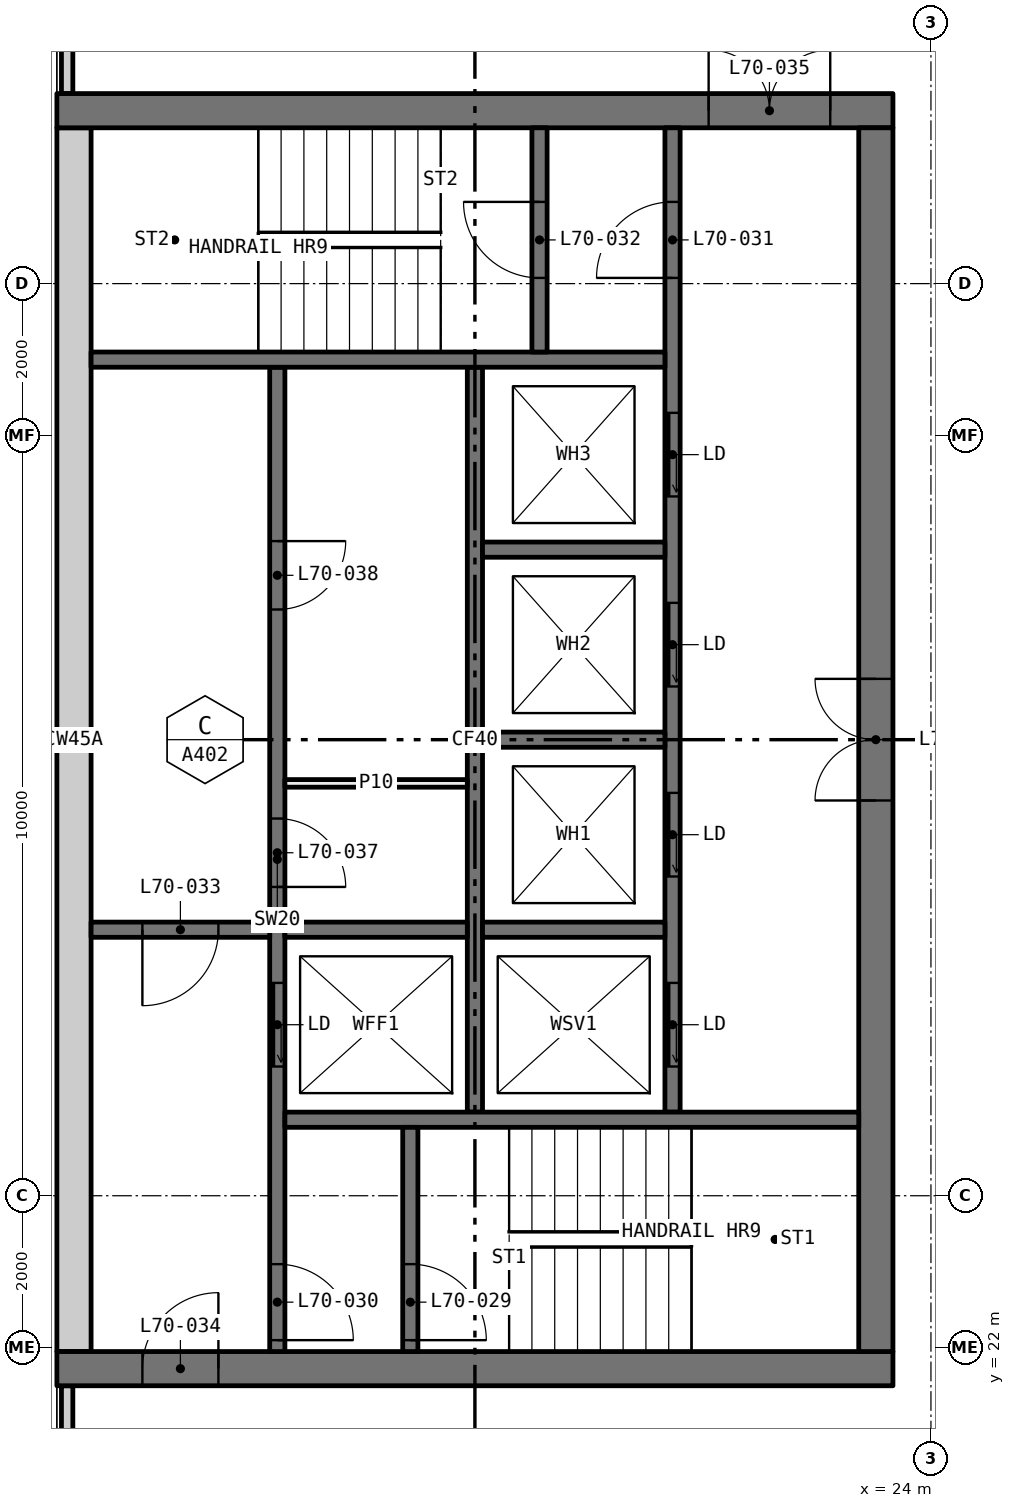
"""IFC4 building model, lengths in metres.
Left out: names, types, materials, properties, quantities, classifications, styles, units other than length and angle.
Written with IfcOpenShell. Run it as: python <this file> out.ifc"""

import sys

from ifc_helpers import new_model, si_unit, direction, frame, frame_2d, origin, place, context, subcontext, project, spatial, rectangle, extrude, element, fill, save


model = new_model("IFC4")
c1 = context("Model", 3, precision=1e-05, world=origin(), true_north=direction((0.0, 1.0)))
c2 = subcontext(c1, "Body", "Model", "MODEL_VIEW")
j1 = project(units=[si_unit("LENGTHUNIT", "METRE"), si_unit("PLANEANGLEUNIT", "RADIAN")], contexts=[c1])
p1 = place(None, origin())
s1 = spatial("IfcSite", under=j1, at=p1, CompositionType="ELEMENT")
p2 = place(p1, origin())
s2 = spatial("IfcBuilding", under=s1, at=p2, CompositionType="ELEMENT")
p3 = place(p2, frame((0.0, 0.0, 259.35)))
s3 = spatial("IfcBuildingStorey", under=s2, at=p3, CompositionType="ELEMENT", Elevation=259.35)
for number, where, z_axis, x_axis in (
    (1, (12.635, 18.71, 0.0), (0.0, 0.0, 1.0), (0.0, 1.0, 0.0)),
    (2, (12.635, 38.5, 0.0), (0.0, 0.0, 1.0), (0.0, 1.0, 0.0)),
):
    element("IfcWall", number, at=place(p3, frame(where, z_axis=z_axis, x_axis=x_axis)), inside=s3, PredefinedType="ELEMENTEDWALL", context=c2, shape_type="SweptSolid", body=[
        extrude(rectangle(XDim=2.79, YDim=0.15, at=frame_2d((1.395, 0.0))), origin(), (0.0, 0.0, 1.0), 3.05),
    ])
p4 = place(p3, frame((12.5, 21.725, 0.0), z_axis=(0.0, 0.0, 1.0), x_axis=(1.0, 0.0, 0.0)))
e3 = element("IfcWall", 3, at=p4, inside=s3, PredefinedType="SHEAR", context=c2, shape_type="SweptSolid", body=[
    extrude(rectangle(XDim=11.0, YDim=0.45, at=frame_2d((5.5, 0.0))), origin(), (0.0, 0.0, 1.0), 3.05),
])
p5 = place(p4, frame((1.125, 0.0, 0.0)))
e4 = element("IfcOpeningElement", 4, at=p5, cuts=e3, PredefinedType="OPENING", context=c2, shape_type="SweptSolid", body=[
    extrude(rectangle(XDim=1.0, YDim=2.1, at=frame_2d((0.5, 1.05))), frame((0.0, 0.235, 0.0), z_axis=(0.0, -1.0, 0.0), x_axis=(1.0, 0.0, 0.0)), (0.0, 0.0, 1.0), 0.47),
])
p6 = place(p3, frame((12.5, 38.275, 0.0), z_axis=(0.0, 0.0, 1.0), x_axis=(1.0, 0.0, 0.0)))
e5 = element("IfcWall", 5, at=p6, inside=s3, PredefinedType="SHEAR", context=c2, shape_type="SweptSolid", body=[
    extrude(rectangle(XDim=11.0, YDim=0.45, at=frame_2d((5.5, 0.0))), origin(), (0.0, 0.0, 1.0), 3.05),
])
p7 = place(p6, frame((8.575, 0.0, 0.0)))
e6 = element("IfcOpeningElement", 6, at=p7, cuts=e5, PredefinedType="OPENING", context=c2, shape_type="SweptSolid", body=[
    extrude(rectangle(XDim=1.6, YDim=2.1, at=frame_2d((0.8, 1.05))), frame((0.0, 0.235, 0.0), z_axis=(0.0, -1.0, 0.0), x_axis=(1.0, 0.0, 0.0)), (0.0, 0.0, 1.0), 0.47),
])
p8 = place(p3, frame((12.725, 21.95, 0.0), z_axis=(0.0, 0.0, 1.0), x_axis=(0.0, 1.0, 0.0)))
e7 = element("IfcWall", 7, at=p8, inside=s3, PredefinedType="SHEAR", context=c2, shape_type="SweptSolid", body=[
    extrude(rectangle(XDim=16.1, YDim=0.45, at=frame_2d((8.05, 0.0))), origin(), (0.0, 0.0, 1.0), 3.05),
])
p9 = place(p3, frame((23.275, 21.95, 0.0), z_axis=(0.0, 0.0, 1.0), x_axis=(0.0, 1.0, 0.0)))
e8 = element("IfcWall", 8, at=p9, inside=s3, PredefinedType="SHEAR", context=c2, shape_type="SweptSolid", body=[
    extrude(rectangle(XDim=16.1, YDim=0.45, at=frame_2d((8.05, 0.0))), origin(), (0.0, 0.0, 1.0), 3.05),
])
p10 = place(p9, frame((7.25, 0.0, 0.0)))
e9 = element("IfcOpeningElement", 9, at=p10, cuts=e8, PredefinedType="OPENING", context=c2, shape_type="SweptSolid", body=[
    extrude(rectangle(XDim=1.6, YDim=2.1, at=frame_2d((0.8, 1.05))), frame((0.0, 0.235, 0.0), z_axis=(0.0, -1.0, 0.0), x_axis=(1.0, 0.0, 0.0)), (0.0, 0.0, 1.0), 0.47),
])
p11 = place(p3, frame((15.4, 21.95, 0.0), z_axis=(0.0, 0.0, 1.0), x_axis=(0.0, 1.0, 0.0)))
e10 = element("IfcWall", 10, at=p11, inside=s3, PredefinedType="SOLIDWALL", context=c2, shape_type="SweptSolid", body=[
    extrude(rectangle(XDim=12.95, YDim=0.2, at=frame_2d((6.475, 0.0))), origin(), (0.0, 0.0, 1.0), 3.05),
])
p12 = place(p11, frame((3.75, 0.0, 0.0)))
e11 = element("IfcOpeningElement", 11, at=p12, cuts=e10, PredefinedType="OPENING", context=c2, shape_type="SweptSolid", body=[
    extrude(rectangle(XDim=1.1, YDim=2.1, at=frame_2d((0.55, 1.05))), frame((0.0, 0.11, 0.0), z_axis=(0.0, -1.0, 0.0), x_axis=(1.0, 0.0, 0.0)), (0.0, 0.0, 1.0), 0.22),
])
p13 = place(p11, frame((0.15, 0.0, 0.0)))
e12 = element("IfcOpeningElement", 12, at=p13, cuts=e10, PredefinedType="OPENING", context=c2, shape_type="SweptSolid", body=[
    extrude(rectangle(XDim=1.0, YDim=2.1, at=frame_2d((0.5, 1.05))), frame((0.0, 0.11, 0.0), z_axis=(0.0, -1.0, 0.0), x_axis=(1.0, 0.0, 0.0)), (0.0, 0.0, 1.0), 0.22),
])
p14 = place(p11, frame((6.113, 0.0, 0.0)))
e13 = element("IfcOpeningElement", 13, at=p14, cuts=e10, PredefinedType="OPENING", context=c2, shape_type="SweptSolid", body=[
    extrude(rectangle(XDim=0.9, YDim=2.1, at=frame_2d((0.45, 1.05))), frame((0.0, 0.11, 0.0), z_axis=(0.0, -1.0, 0.0), x_axis=(1.0, 0.0, 0.0)), (0.0, 0.0, 1.0), 0.22),
])
p15 = place(p11, frame((9.762, 0.0, 0.0)))
e14 = element("IfcOpeningElement", 14, at=p15, cuts=e10, PredefinedType="OPENING", context=c2, shape_type="SweptSolid", body=[
    extrude(rectangle(XDim=0.9, YDim=2.1, at=frame_2d((0.45, 1.05))), frame((0.0, 0.11, 0.0), z_axis=(0.0, -1.0, 0.0), x_axis=(1.0, 0.0, 0.0)), (0.0, 0.0, 1.0), 0.22),
])
p16 = place(p3, frame((20.6, 25.1, 0.0), z_axis=(0.0, 0.0, 1.0), x_axis=(0.0, 1.0, 0.0)))
e15 = element("IfcWall", 15, at=p16, inside=s3, PredefinedType="SOLIDWALL", context=c2, shape_type="SweptSolid", body=[
    extrude(rectangle(XDim=12.95, YDim=0.2, at=frame_2d((6.475, 0.0))), origin(), (0.0, 0.0, 1.0), 3.05),
])
p17 = place(p16, frame((0.6, 0.0, 0.0)))
e16 = element("IfcOpeningElement", 16, at=p17, cuts=e15, PredefinedType="OPENING", context=c2, shape_type="SweptSolid", body=[
    extrude(rectangle(XDim=1.1, YDim=2.1, at=frame_2d((0.55, 1.05))), frame((0.0, 0.11, 0.0), z_axis=(0.0, -1.0, 0.0), x_axis=(1.0, 0.0, 0.0)), (0.0, 0.0, 1.0), 0.22),
])
p18 = place(p16, frame((3.1, 0.0, 0.0)))
e17 = element("IfcOpeningElement", 17, at=p18, cuts=e15, PredefinedType="OPENING", context=c2, shape_type="SweptSolid", body=[
    extrude(rectangle(XDim=1.1, YDim=2.1, at=frame_2d((0.55, 1.05))), frame((0.0, 0.11, 0.0), z_axis=(0.0, -1.0, 0.0), x_axis=(1.0, 0.0, 0.0)), (0.0, 0.0, 1.0), 0.22),
])
p19 = place(p16, frame((5.6, 0.0, 0.0)))
e18 = element("IfcOpeningElement", 18, at=p19, cuts=e15, PredefinedType="OPENING", context=c2, shape_type="SweptSolid", body=[
    extrude(rectangle(XDim=1.1, YDim=2.1, at=frame_2d((0.55, 1.05))), frame((0.0, 0.11, 0.0), z_axis=(0.0, -1.0, 0.0), x_axis=(1.0, 0.0, 0.0)), (0.0, 0.0, 1.0), 0.22),
])
p20 = place(p16, frame((8.1, 0.0, 0.0)))
e19 = element("IfcOpeningElement", 19, at=p20, cuts=e15, PredefinedType="OPENING", context=c2, shape_type="SweptSolid", body=[
    extrude(rectangle(XDim=1.1, YDim=2.1, at=frame_2d((0.55, 1.05))), frame((0.0, 0.11, 0.0), z_axis=(0.0, -1.0, 0.0), x_axis=(1.0, 0.0, 0.0)), (0.0, 0.0, 1.0), 0.22),
])
p21 = place(p16, frame((10.975, 0.0, 0.0)))
e20 = element("IfcOpeningElement", 20, at=p21, cuts=e15, PredefinedType="OPENING", context=c2, shape_type="SweptSolid", body=[
    extrude(rectangle(XDim=1.0, YDim=2.1, at=frame_2d((0.5, 1.05))), frame((0.0, 0.11, 0.0), z_axis=(0.0, -1.0, 0.0), x_axis=(1.0, 0.0, 0.0)), (0.0, 0.0, 1.0), 0.22),
])
p22 = place(p3, frame((18.0, 25.1, 0.0), z_axis=(0.0, 0.0, 1.0), x_axis=(0.0, 1.0, 0.0)))
e21 = element("IfcWall", 21, at=p22, inside=s3, PredefinedType="SOLIDWALL", context=c2, shape_type="SweptSolid", body=[
    extrude(rectangle(XDim=9.8, YDim=0.2, at=frame_2d((4.9, 0.0))), origin(), (0.0, 0.0, 1.0), 3.05),
])
for number, where, z_axis, x_axis in (
    (22, (15.5, 25.0, 0.0), (0.0, 0.0, 1.0), (1.0, 0.0, 0.0)),
    (23, (12.95, 35.0, 0.0), (0.0, 0.0, 1.0), (1.0, 0.0, 0.0)),
):
    element("IfcWall", number, at=place(p3, frame(where, z_axis=z_axis, x_axis=x_axis)), inside=s3, PredefinedType="SOLIDWALL", context=c2, shape_type="SweptSolid", body=[
        extrude(rectangle(XDim=7.55, YDim=0.2, at=frame_2d((3.775, 0.0))), origin(), (0.0, 0.0, 1.0), 3.05),
    ])
p23 = place(p3, frame((12.95, 27.5, 0.0), z_axis=(0.0, 0.0, 1.0), x_axis=(1.0, 0.0, 0.0)))
e24 = element("IfcWall", 24, at=p23, inside=s3, PredefinedType="SOLIDWALL", context=c2, shape_type="SweptSolid", body=[
    extrude(rectangle(XDim=2.35, YDim=0.2, at=frame_2d((1.175, 0.0))), origin(), (0.0, 0.0, 1.0), 3.05),
])
p24 = place(p23, frame((0.675, 0.0, 0.0)))
e25 = element("IfcOpeningElement", 25, at=p24, cuts=e24, PredefinedType="OPENING", context=c2, shape_type="SweptSolid", body=[
    extrude(rectangle(XDim=1.0, YDim=2.1, at=frame_2d((0.5, 1.05))), frame((0.0, 0.11, 0.0), z_axis=(0.0, -1.0, 0.0), x_axis=(1.0, 0.0, 0.0)), (0.0, 0.0, 1.0), 0.22),
])
p25 = place(p3, frame((17.15, 21.95, 0.0), z_axis=(0.0, 0.0, 1.0), x_axis=(0.0, 1.0, 0.0)))
e26 = element("IfcWall", 26, at=p25, inside=s3, PredefinedType="SOLIDWALL", context=c2, shape_type="SweptSolid", body=[
    extrude(rectangle(XDim=2.95, YDim=0.2, at=frame_2d((1.475, 0.0))), origin(), (0.0, 0.0, 1.0), 3.05),
])
p26 = place(p25, frame((0.15, 0.0, 0.0)))
e27 = element("IfcOpeningElement", 27, at=p26, cuts=e26, PredefinedType="OPENING", context=c2, shape_type="SweptSolid", body=[
    extrude(rectangle(XDim=1.0, YDim=2.1, at=frame_2d((0.5, 1.05))), frame((0.0, 0.11, 0.0), z_axis=(0.0, -1.0, 0.0), x_axis=(1.0, 0.0, 0.0)), (0.0, 0.0, 1.0), 0.22),
])
p27 = place(p3, frame((18.85, 35.1, 0.0), z_axis=(0.0, 0.0, 1.0), x_axis=(0.0, 1.0, 0.0)))
e28 = element("IfcWall", 28, at=p27, inside=s3, PredefinedType="SOLIDWALL", context=c2, shape_type="SweptSolid", body=[
    extrude(rectangle(XDim=2.95, YDim=0.2, at=frame_2d((1.475, 0.0))), origin(), (0.0, 0.0, 1.0), 3.05),
])
p28 = place(p27, frame((0.975, 0.0, 0.0)))
e29 = element("IfcOpeningElement", 29, at=p28, cuts=e28, PredefinedType="OPENING", context=c2, shape_type="SweptSolid", body=[
    extrude(rectangle(XDim=1.0, YDim=2.1, at=frame_2d((0.5, 1.05))), frame((0.0, 0.11, 0.0), z_axis=(0.0, -1.0, 0.0), x_axis=(1.0, 0.0, 0.0)), (0.0, 0.0, 1.0), 0.22),
])
for number, where, z_axis, x_axis in (
    (30, (15.5, 27.5, 0.0), (0.0, 0.0, 1.0), (1.0, 0.0, 0.0)),
    (31, (18.1, 27.5, 0.0), (0.0, 0.0, 1.0), (1.0, 0.0, 0.0)),
    (32, (18.1, 30.0, 0.0), (0.0, 0.0, 1.0), (1.0, 0.0, 0.0)),
    (33, (18.1, 32.5, 0.0), (0.0, 0.0, 1.0), (1.0, 0.0, 0.0)),
):
    element("IfcWall", number, at=place(p3, frame(where, z_axis=z_axis, x_axis=x_axis)), inside=s3, PredefinedType="SOLIDWALL", context=c2, shape_type="SweptSolid", body=[
        extrude(rectangle(XDim=2.4, YDim=0.2, at=frame_2d((1.2, 0.0))), origin(), (0.0, 0.0, 1.0), 3.05),
    ])
p29 = place(p3, frame((15.5, 29.425, 0.0), z_axis=(0.0, 0.0, 1.0), x_axis=(1.0, 0.0, 0.0)))
e34 = element("IfcWall", 34, at=p29, inside=s3, PredefinedType="PARTITIONING", context=c2, shape_type="SweptSolid", body=[
    extrude(rectangle(XDim=2.4, YDim=0.1, at=frame_2d((1.2, 0.0))), origin(), (0.0, 0.0, 1.0), 3.05),
])
p30 = place(p17, origin())
e35 = element("IfcDoor", 35, at=p30, inside=s3, OperationType="SLIDING_TO_LEFT", PredefinedType="DOOR", context=c2, shape_type="SweptSolid", body=[
    extrude(rectangle(XDim=1.1, YDim=2.1, at=frame_2d((0.55, 1.05))), frame((0.0, 0.025, 0.0), z_axis=(0.0, -1.0, 0.0), x_axis=(1.0, 0.0, 0.0)), (0.0, 0.0, 1.0), 0.05),
])
fill(e16, e35)
p31 = place(p18, origin())
e36 = element("IfcDoor", 36, at=p31, inside=s3, OperationType="SLIDING_TO_LEFT", PredefinedType="DOOR", context=c2, shape_type="SweptSolid", body=[
    extrude(rectangle(XDim=1.1, YDim=2.1, at=frame_2d((0.55, 1.05))), frame((0.0, 0.025, 0.0), z_axis=(0.0, -1.0, 0.0), x_axis=(1.0, 0.0, 0.0)), (0.0, 0.0, 1.0), 0.05),
])
fill(e17, e36)
p32 = place(p19, origin())
e37 = element("IfcDoor", 37, at=p32, inside=s3, OperationType="SLIDING_TO_LEFT", PredefinedType="DOOR", context=c2, shape_type="SweptSolid", body=[
    extrude(rectangle(XDim=1.1, YDim=2.1, at=frame_2d((0.55, 1.05))), frame((0.0, 0.025, 0.0), z_axis=(0.0, -1.0, 0.0), x_axis=(1.0, 0.0, 0.0)), (0.0, 0.0, 1.0), 0.05),
])
fill(e18, e37)
p33 = place(p20, origin())
e38 = element("IfcDoor", 38, at=p33, inside=s3, OperationType="SLIDING_TO_LEFT", PredefinedType="DOOR", context=c2, shape_type="SweptSolid", body=[
    extrude(rectangle(XDim=1.1, YDim=2.1, at=frame_2d((0.55, 1.05))), frame((0.0, 0.025, 0.0), z_axis=(0.0, -1.0, 0.0), x_axis=(1.0, 0.0, 0.0)), (0.0, 0.0, 1.0), 0.05),
])
fill(e19, e38)
p34 = place(p12, origin())
e39 = element("IfcDoor", 39, at=p34, inside=s3, OperationType="SLIDING_TO_LEFT", PredefinedType="DOOR", context=c2, shape_type="SweptSolid", body=[
    extrude(rectangle(XDim=1.1, YDim=2.1, at=frame_2d((0.55, 1.05))), frame((0.0, 0.025, 0.0), z_axis=(0.0, -1.0, 0.0), x_axis=(1.0, 0.0, 0.0)), (0.0, 0.0, 1.0), 0.05),
])
fill(e11, e39)
p35 = place(p26, frame((1.0, 0.0, 0.0), x_axis=(-1.0, 0.0, 0.0)))
e40 = element("IfcDoor", 40, at=p35, inside=s3, OperationType="SINGLE_SWING_LEFT", PredefinedType="DOOR", context=c2, shape_type="SweptSolid", body=[
    extrude(rectangle(XDim=1.0, YDim=2.1, at=frame_2d((0.5, 1.05))), frame((0.0, 0.025, 0.0), z_axis=(0.0, -1.0, 0.0), x_axis=(1.0, 0.0, 0.0)), (0.0, 0.0, 1.0), 0.05),
])
fill(e27, e40)
p36 = place(p13, frame((1.0, 0.0, 0.0), x_axis=(-1.0, 0.0, 0.0)))
e41 = element("IfcDoor", 41, at=p36, inside=s3, OperationType="SINGLE_SWING_LEFT", PredefinedType="DOOR", context=c2, shape_type="SweptSolid", body=[
    extrude(rectangle(XDim=1.0, YDim=2.1, at=frame_2d((0.5, 1.05))), frame((0.0, 0.025, 0.0), z_axis=(0.0, -1.0, 0.0), x_axis=(1.0, 0.0, 0.0)), (0.0, 0.0, 1.0), 0.05),
])
fill(e12, e41)
p37 = place(p21, origin())
e42 = element("IfcDoor", 42, at=p37, inside=s3, OperationType="SINGLE_SWING_RIGHT", PredefinedType="DOOR", context=c2, shape_type="SweptSolid", body=[
    extrude(rectangle(XDim=1.0, YDim=2.1, at=frame_2d((0.5, 1.05))), frame((0.0, 0.025, 0.0), z_axis=(0.0, -1.0, 0.0), x_axis=(1.0, 0.0, 0.0)), (0.0, 0.0, 1.0), 0.05),
])
fill(e20, e42)
p38 = place(p28, origin())
e43 = element("IfcDoor", 43, at=p38, inside=s3, OperationType="SINGLE_SWING_LEFT", PredefinedType="DOOR", context=c2, shape_type="SweptSolid", body=[
    extrude(rectangle(XDim=1.0, YDim=2.1, at=frame_2d((0.5, 1.05))), frame((0.0, 0.025, 0.0), z_axis=(0.0, -1.0, 0.0), x_axis=(1.0, 0.0, 0.0)), (0.0, 0.0, 1.0), 0.05),
])
fill(e29, e43)
p39 = place(p24, frame((1.0, 0.0, 0.0), x_axis=(-1.0, 0.0, 0.0)))
e44 = element("IfcDoor", 44, at=p39, inside=s3, OperationType="SINGLE_SWING_LEFT", PredefinedType="DOOR", context=c2, shape_type="SweptSolid", body=[
    extrude(rectangle(XDim=1.0, YDim=2.1, at=frame_2d((0.5, 1.05))), frame((0.0, 0.025, 0.0), z_axis=(0.0, -1.0, 0.0), x_axis=(1.0, 0.0, 0.0)), (0.0, 0.0, 1.0), 0.05),
])
fill(e25, e44)
p40 = place(p5, origin())
e45 = element("IfcDoor", 45, at=p40, inside=s3, OperationType="SINGLE_SWING_LEFT", PredefinedType="DOOR", context=c2, shape_type="SweptSolid", body=[
    extrude(rectangle(XDim=1.0, YDim=2.1, at=frame_2d((0.5, 1.05))), frame((0.0, 0.025, 0.0), z_axis=(0.0, -1.0, 0.0), x_axis=(1.0, 0.0, 0.0)), (0.0, 0.0, 1.0), 0.05),
])
fill(e4, e45)
p41 = place(p7, origin())
e46 = element("IfcDoor", 46, at=p41, inside=s3, OperationType="DOUBLE_DOOR_SINGLE_SWING", PredefinedType="DOOR", context=c2, shape_type="SweptSolid", body=[
    extrude(rectangle(XDim=1.6, YDim=2.1, at=frame_2d((0.8, 1.05))), frame((0.0, 0.025, 0.0), z_axis=(0.0, -1.0, 0.0), x_axis=(1.0, 0.0, 0.0)), (0.0, 0.0, 1.0), 0.05),
])
fill(e6, e46)
p42 = place(p10, origin())
e47 = element("IfcDoor", 47, at=p42, inside=s3, OperationType="DOUBLE_DOOR_SINGLE_SWING", PredefinedType="DOOR", context=c2, shape_type="SweptSolid", body=[
    extrude(rectangle(XDim=1.6, YDim=2.1, at=frame_2d((0.8, 1.05))), frame((0.0, 0.025, 0.0), z_axis=(0.0, -1.0, 0.0), x_axis=(1.0, 0.0, 0.0)), (0.0, 0.0, 1.0), 0.05),
])
fill(e9, e47)
p43 = place(p14, frame((0.9, 0.0, 0.0), x_axis=(-1.0, 0.0, 0.0)))
e48 = element("IfcDoor", 48, at=p43, inside=s3, OperationType="SINGLE_SWING_LEFT", PredefinedType="DOOR", context=c2, shape_type="SweptSolid", body=[
    extrude(rectangle(XDim=0.9, YDim=2.1, at=frame_2d((0.45, 1.05))), frame((0.0, 0.025, 0.0), z_axis=(0.0, -1.0, 0.0), x_axis=(1.0, 0.0, 0.0)), (0.0, 0.0, 1.0), 0.05),
])
fill(e13, e48)
p44 = place(p15, frame((0.9, 0.0, 0.0), x_axis=(-1.0, 0.0, 0.0)))
e49 = element("IfcDoor", 49, at=p44, inside=s3, OperationType="SINGLE_SWING_RIGHT", PredefinedType="DOOR", context=c2, shape_type="SweptSolid", body=[
    extrude(rectangle(XDim=0.9, YDim=2.1, at=frame_2d((0.45, 1.05))), frame((0.0, 0.025, 0.0), z_axis=(0.0, -1.0, 0.0), x_axis=(1.0, 0.0, 0.0)), (0.0, 0.0, 1.0), 0.05),
])
fill(e14, e49)
save(model, sys.argv[1])
